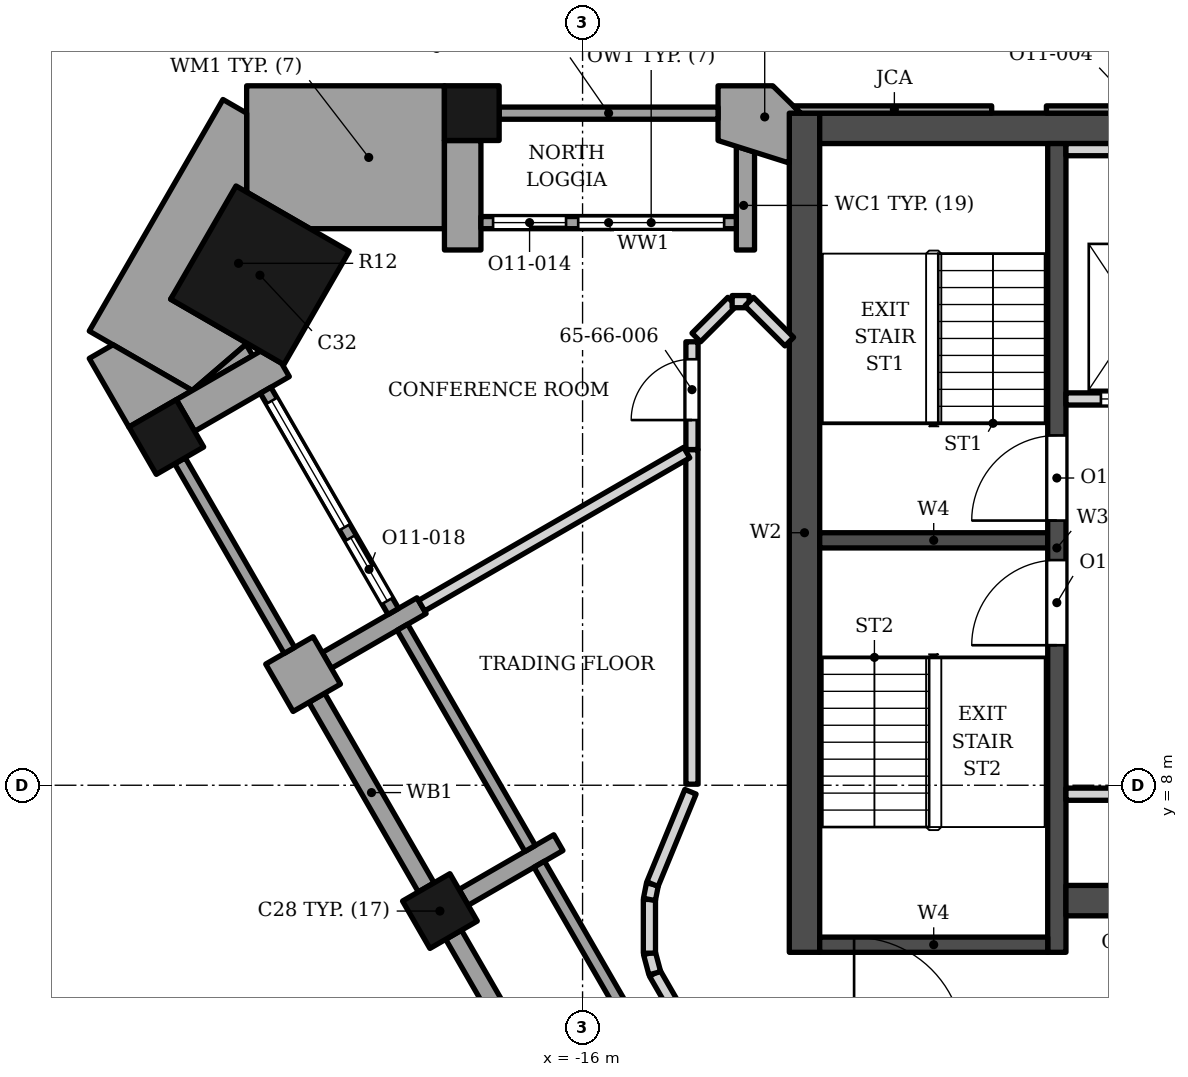
"""IFC4 building model, lengths in metres.
Left out: names, types, materials, properties, quantities, classifications, styles, units other than length and angle.
Written with IfcOpenShell. Run it as: python <this file> out.ifc"""

import sys

from ifc_helpers import new_model, si_unit, direction, frame, frame_2d, origin, origin_2d, place, context, subcontext, project, spatial, polyline, rectangle, outline, extrude, element, fill, save


model = new_model("IFC4")
c1 = context("Model", 3, precision=1e-05, world=origin(), true_north=direction((0.0, 1.0)))
c2 = subcontext(c1, "Body", "Model", "MODEL_VIEW")
j1 = project(units=[si_unit("LENGTHUNIT", "METRE"), si_unit("PLANEANGLEUNIT", "RADIAN")], contexts=[c1])
p1 = place(None, origin())
s1 = spatial("IfcSite", under=j1, at=p1, CompositionType="ELEMENT")
p2 = place(p1, origin())
s2 = spatial("IfcBuilding", under=s1, at=p2, CompositionType="ELEMENT")
p3 = place(p2, frame((0.0, 0.0, 271.6)))
s3 = spatial("IfcBuildingStorey", under=s2, at=p3, CompositionType="ELEMENT", Elevation=271.6)
p4 = place(p3, frame((-12.1, 18.802, 0.0), z_axis=(0.0, 0.0, 1.0), x_axis=(1.0, 0.0, 0.0)))
e1 = element("IfcWall", 1, at=p4, inside=s3, PredefinedType="SHEAR", context=c2, shape_type="SweptSolid", body=[
    extrude(rectangle(XDim=24.2, YDim=0.5, at=frame_2d((12.1, 0.0))), origin(), (0.0, 0.0, 1.0), 3.9),
])
p5 = place(p3, frame((-12.35, 5.253, 0.0), z_axis=(0.0, 0.0, 1.0), x_axis=(0.0, 1.0, 0.0)))
e2 = element("IfcWall", 2, at=p5, inside=s3, PredefinedType="SHEAR", context=c2, shape_type="SweptSolid", body=[
    extrude(rectangle(XDim=13.8, YDim=0.5, at=frame_2d((6.9, 0.0))), origin(), (0.0, 0.0, 1.0), 3.9),
])
p6 = place(p3, frame((-8.2, 5.253, 0.0), z_axis=(0.0, 0.0, 1.0), x_axis=(0.0, 1.0, 0.0)))
e3 = element("IfcWall", 3, at=p6, inside=s3, PredefinedType="SHEAR", context=c2, shape_type="SweptSolid", body=[
    extrude(rectangle(XDim=13.3, YDim=0.3, at=frame_2d((6.65, 0.0))), origin(), (0.0, 0.0, 1.0), 3.9),
])
p7 = place(p6, frame((7.1, 0.0, 0.0)))
e4 = element("IfcOpeningElement", 4, at=p7, cuts=e3, PredefinedType="OPENING", context=c2, shape_type="SweptSolid", body=[
    extrude(rectangle(XDim=1.4, YDim=2.1, at=frame_2d((0.7, 1.05))), frame((0.0, 0.16, 0.0), z_axis=(0.0, -1.0, 0.0), x_axis=(1.0, 0.0, 0.0)), (0.0, 0.0, 1.0), 0.32),
])
p8 = place(p6, frame((5.05, 0.0, 0.0)))
e5 = element("IfcOpeningElement", 5, at=p8, cuts=e3, PredefinedType="OPENING", context=c2, shape_type="SweptSolid", body=[
    extrude(rectangle(XDim=1.4, YDim=2.1, at=frame_2d((0.7, 1.05))), frame((0.0, 0.16, 0.0), z_axis=(0.0, -1.0, 0.0), x_axis=(1.0, 0.0, 0.0)), (0.0, 0.0, 1.0), 0.32),
])
for number, where, z_axis, x_axis in (
    (6, (-12.1, 12.028, 0.0), (0.0, 0.0, 1.0), (1.0, 0.0, 0.0)),
    (7, (-12.1, 5.378, 0.0), (0.0, 0.0, 1.0), (1.0, 0.0, 0.0)),
):
    element("IfcWall", number, at=place(p3, frame(where, z_axis=z_axis, x_axis=x_axis)), inside=s3, PredefinedType="SHEAR", context=c2, shape_type="SweptSolid", body=[
        extrude(rectangle(XDim=3.75, YDim=0.25, at=frame_2d((1.875, 0.0))), origin(), (0.0, 0.0, 1.0), 3.9),
    ])
p9 = place(p3, frame((-8.05, 6.103, 0.0), z_axis=(0.0, 0.0, 1.0), x_axis=(1.0, 0.0, 0.0)))
e8 = element("IfcWall", 8, at=p9, inside=s3, PredefinedType="SHEAR", context=c2, shape_type="SweptSolid", body=[
    extrude(rectangle(XDim=7.05, YDim=0.5, at=frame_2d((3.525, 0.0))), origin(), (0.0, 0.0, 1.0), 3.9),
])
p10 = place(p9, frame((0.825, 0.0, 0.0)))
e9 = element("IfcOpeningElement", 9, at=p10, cuts=e8, PredefinedType="OPENING", context=c2, shape_type="SweptSolid", body=[
    extrude(rectangle(XDim=0.9, YDim=2.1, at=frame_2d((0.45, 1.05))), frame((0.0, 0.26, 0.0), z_axis=(0.0, -1.0, 0.0), x_axis=(1.0, 0.0, 0.0)), (0.0, 0.0, 1.0), 0.52),
])
p11 = place(p3, frame((-21.306, 16.387, 0.0), z_axis=(0.0, 0.0, 1.0), x_axis=(0.866025412511, -0.499999984885, 0.0)))
e10 = element("IfcColumn", 10, at=p11, inside=s3, PredefinedType="COLUMN", context=c2, shape_type="SweptSolid", body=[
    extrude(rectangle(XDim=2.15, YDim=2.15, at=origin_2d()), origin(), (0.0, 0.0, 1.0), 3.9),
])
for number, where, z_axis, x_axis in (
    (11, (-22.846, 13.727, 0.0), (0.0, 0.0, 1.0), (0.5, -0.866, 0.0)),
    (12, (-18.346, 5.931, 0.0), (0.0, 0.0, 1.0), (0.5, -0.866, 0.0)),
    (13, (-17.822, 19.053, 0.0), (0.0, 0.0, 1.0), (-1.0, 0.0, 0.0)),
):
    element("IfcColumn", number, at=place(p3, frame(where, z_axis=z_axis, x_axis=x_axis)), inside=s3, PredefinedType="COLUMN", context=c2, shape_type="SweptSolid", body=[
        extrude(rectangle(XDim=0.9, YDim=0.9, at=origin_2d()), origin(), (0.0, 0.0, 1.0), 3.9),
    ])
p12 = place(p3, origin())
e14 = element("IfcWall", 14, at=p12, inside=s3, PredefinedType="SOLIDWALL", context=c2, shape_type="SweptSolid", body=[
    extrude(outline(polyline([(-21.296, 15.14), (-22.68, 14.34), (-22.38, 13.821), (-20.823, 14.72), (-20.95, 14.94), (-21.296, 15.14)])), origin(), (0.0, 0.0, 1.0), 3.0),
])
p13 = place(p3, frame((-20.986, 9.603, 0.0), z_axis=(0.0, 0.0, 1.0), x_axis=(0.866013897511, 0.50001992892, 0.0)))
e15 = element("IfcWall", 15, at=p13, inside=s3, PredefinedType="SOLIDWALL", context=c2, shape_type="SweptSolid", body=[
    extrude(rectangle(XDim=0.9, YDim=0.9, at=frame_2d((0.45, 0.0))), origin(), (0.0, 0.0, 1.0), 3.0),
])
p14 = place(p3, frame((-20.207, 10.053, 0.0), z_axis=(0.0, 0.0, 1.0), x_axis=(0.865989075817, 0.500062916607, 0.0)))
e16 = element("IfcWall", 16, at=p14, inside=s3, PredefinedType="SOLIDWALL", context=c2, shape_type="SweptSolid", body=[
    extrude(rectangle(XDim=1.8, YDim=0.3, at=frame_2d((0.9, 0.0))), origin(), (0.0, 0.0, 1.0), 3.0),
])
p15 = place(p3, frame((-17.956, 6.156, 0.0), z_axis=(0.0, 0.0, 1.0), x_axis=(0.866072636901, 0.499918180918, 0.0)))
e17 = element("IfcWall", 17, at=p15, inside=s3, PredefinedType="SOLIDWALL", context=c2, shape_type="SweptSolid", body=[
    extrude(rectangle(XDim=1.8, YDim=0.3, at=frame_2d((0.9, 0.0))), origin(), (0.0, 0.0, 1.0), 2.95),
])
p16 = place(p3, frame((-22.621, 13.335, 0.0), z_axis=(0.0, 0.0, 1.0), x_axis=(0.500012057535, -0.866018442252, 0.0)))
e18 = element("IfcWall", 18, at=p16, inside=s3, PredefinedType="SOLIDWALL", context=c2, shape_type="SweptSolid", body=[
    extrude(rectangle(XDim=3.6, YDim=0.2, at=frame_2d((1.8, 0.0))), origin(), (0.0, 0.0, 1.0), 3.0),
])
p17 = place(p3, frame((-21.212, 14.495, 0.0), z_axis=(0.0, 0.0, 1.0), x_axis=(0.500002543286, -0.866023935413, 0.0)))
e19 = element("IfcWall", 19, at=p17, inside=s3, PredefinedType="ELEMENTEDWALL", context=c2, shape_type="SweptSolid", body=[
    extrude(rectangle(XDim=4.2, YDim=0.2, at=frame_2d((2.1, 0.0))), origin(), (0.0, 0.0, 1.0), 3.0),
])
p18 = place(p17, frame((0.2, 0.0, 0.45)))
e20 = element("IfcOpeningElement", 20, at=p18, cuts=e19, PredefinedType="OPENING", context=c2, shape_type="SweptSolid", body=[
    extrude(rectangle(XDim=2.4, YDim=2.25, at=frame_2d((1.2, 1.125))), frame((0.0, 0.11, 0.0), z_axis=(0.0, -1.0, 0.0), x_axis=(1.0, 0.0, 0.0)), (0.0, 0.0, 1.0), 0.22),
])
p19 = place(p17, frame((2.8, 0.0, 0.0)))
e21 = element("IfcOpeningElement", 21, at=p19, cuts=e19, PredefinedType="OPENING", context=c2, shape_type="SweptSolid", body=[
    extrude(rectangle(XDim=1.2, YDim=2.7, at=frame_2d((0.6, 1.35))), frame((0.0, 0.11, 0.0), z_axis=(0.0, -1.0, 0.0), x_axis=(1.0, 0.0, 0.0)), (0.0, 0.0, 1.0), 0.22),
])
p20 = place(p3, frame((-20.371, 9.438, 0.0), z_axis=(0.0, 0.0, 1.0), x_axis=(0.500012057535, -0.866018442252, 0.0)))
e22 = element("IfcWall", 22, at=p20, inside=s3, PredefinedType="SOLIDWALL", context=c2, shape_type="SweptSolid", body=[
    extrude(rectangle(XDim=3.6, YDim=0.3, at=frame_2d((1.8, 0.0))), origin(), (0.0, 0.0, 1.0), 3.0),
])
p21 = place(p3, frame((-18.962, 10.598, 0.0), z_axis=(0.0, 0.0, 1.0), x_axis=(0.500027713859, -0.866009402589, 0.0)))
e23 = element("IfcWall", 23, at=p21, inside=s3, PredefinedType="ELEMENTEDWALL", context=c2, shape_type="SweptSolid", body=[
    extrude(rectangle(XDim=4.2, YDim=0.2, at=frame_2d((2.1, 0.0))), origin(), (0.0, 0.0, 1.0), 3.0),
])
p22 = place(p3, frame((-18.121, 5.541, 0.0), z_axis=(0.0, 0.0, 1.0), x_axis=(0.500012057535, -0.866018442252, 0.0)))
e24 = element("IfcWall", 24, at=p22, inside=s3, PredefinedType="SOLIDWALL", context=c2, shape_type="SweptSolid", body=[
    extrude(rectangle(XDim=3.6, YDim=0.3, at=frame_2d((1.8, 0.0))), origin(), (0.0, 0.0, 1.0), 3.0),
])
p23 = place(p3, frame((-16.712, 6.701, 0.0), z_axis=(0.0, 0.0, 1.0), x_axis=(0.500027713859, -0.866009402589, 0.0)))
e25 = element("IfcWall", 25, at=p23, inside=s3, PredefinedType="ELEMENTEDWALL", context=c2, shape_type="SweptSolid", body=[
    extrude(rectangle(XDim=4.2, YDim=0.2, at=frame_2d((2.1, 0.0))), origin(), (0.0, 0.0, 1.0), 2.95),
])
p24 = place(p3, origin())
e26 = element("IfcWall", 26, at=p24, inside=s3, PredefinedType="SOLIDWALL", context=c2, shape_type="SweptSolid", body=[
    extrude(outline(polyline([(-12.412, 19.052), (-12.872, 19.502), (-13.771, 19.502), (-13.771, 18.603), (-12.6, 18.232), (-12.6, 19.052), (-12.412, 19.052)])), origin(), (0.0, 0.0, 1.0), 3.0),
])
p25 = place(p3, origin())
e27 = element("IfcWall", 27, at=p25, inside=s3, PredefinedType="SOLIDWALL", context=c2, shape_type="SweptSolid", body=[
    extrude(outline(polyline([(-13.472, 16.802), (-13.172, 16.802), (-13.172, 18.413), (-13.472, 18.508), (-13.472, 17.153), (-13.472, 16.802)])), origin(), (0.0, 0.0, 1.0), 3.0),
])
p26 = place(p3, origin())
e28 = element("IfcWall", 28, at=p26, inside=s3, PredefinedType="SOLIDWALL", context=c2, shape_type="SweptSolid", body=[
    extrude(outline(polyline([(-18.271, 18.603), (-18.271, 16.802), (-17.672, 16.802), (-17.672, 18.603), (-18.271, 18.603)])), origin(), (0.0, 0.0, 1.0), 3.0),
])
p27 = place(p3, origin())
e29 = element("IfcWall", 29, at=p27, inside=s3, PredefinedType="ELEMENTEDWALL", context=c2, shape_type="SweptSolid", body=[
    extrude(outline(polyline([(-8.372, 19.173), (-8.372, 19.052), (-4.771, 19.052), (-4.771, 19.173), (-8.372, 19.173)])), origin(), (0.0, 0.0, 1.0), 3.0),
])
p28 = place(p3, origin())
e30 = element("IfcWall", 30, at=p28, inside=s3, PredefinedType="SOLIDWALL", context=c2, shape_type="SweptSolid", body=[
    extrude(outline(polyline([(-12.411, 19.052), (-9.271, 19.052), (-9.271, 19.173), (-12.533, 19.173), (-12.411, 19.052)])), origin(), (0.0, 0.0, 1.0), 3.0),
])
p29 = place(p3, frame((-13.771, 19.052, 0.0), z_axis=(0.0, 0.0, 1.0), x_axis=(-1.0, 0.0, 0.0)))
e31 = element("IfcWall", 31, at=p29, inside=s3, PredefinedType="SOLIDWALL", context=c2, shape_type="SweptSolid", body=[
    extrude(rectangle(XDim=3.6, YDim=0.2, at=frame_2d((1.8, 0.0))), origin(), (0.0, 0.0, 1.0), 3.0),
])
p30 = place(p3, frame((-13.472, 17.252, 0.0), z_axis=(0.0, 0.0, 1.0), x_axis=(-1.0, 0.0, 0.0)))
e32 = element("IfcWall", 32, at=p30, inside=s3, PredefinedType="ELEMENTEDWALL", context=c2, shape_type="SweptSolid", body=[
    extrude(rectangle(XDim=4.2, YDim=0.2, at=frame_2d((2.1, 0.0))), origin(), (0.0, 0.0, 1.0), 3.0),
])
p31 = place(p30, frame((0.2, 0.0, 0.45)))
e33 = element("IfcOpeningElement", 33, at=p31, cuts=e32, PredefinedType="OPENING", context=c2, shape_type="SweptSolid", body=[
    extrude(rectangle(XDim=2.4, YDim=2.25, at=frame_2d((1.2, 1.125))), frame((0.0, 0.11, 0.0), z_axis=(0.0, -1.0, 0.0), x_axis=(1.0, 0.0, 0.0)), (0.0, 0.0, 1.0), 0.22),
])
p32 = place(p30, frame((2.8, 0.0, 0.0)))
e34 = element("IfcOpeningElement", 34, at=p32, cuts=e32, PredefinedType="OPENING", context=c2, shape_type="SweptSolid", body=[
    extrude(rectangle(XDim=1.2, YDim=2.7, at=frame_2d((0.6, 1.35))), frame((0.0, 0.11, 0.0), z_axis=(0.0, -1.0, 0.0), x_axis=(1.0, 0.0, 0.0)), (0.0, 0.0, 1.0), 0.22),
])
p33 = place(p3, origin())
e35 = element("IfcWall", 35, at=p33, inside=s3, PredefinedType="SOLIDWALL", context=c2, shape_type="SweptSolid", body=[
    extrude(outline(polyline([(-20.482, 17.153), (-18.271, 17.153), (-18.271, 18.603), (-18.272, 18.603), (-18.272, 19.502), (-21.525, 19.502), (-21.525, 17.755), (-20.482, 17.153)])), origin(), (0.0, 0.0, 1.0), 3.0),
])
p34 = place(p3, origin())
e36 = element("IfcWall", 36, at=p34, inside=s3, PredefinedType="SOLIDWALL", context=c2, shape_type="SweptSolid", body=[
    extrude(outline(polyline([(-22.774, 15.993), (-21.525, 17.755), (-21.525, 19.052), (-21.914, 19.278), (-24.113, 15.469), (-22.419, 14.491), (-21.516, 15.267), (-22.774, 15.993)])), origin(), (0.0, 0.0, 1.0), 3.0),
])
p35 = place(p3, origin())
e37 = element("IfcWall", 37, at=p35, inside=s3, PredefinedType="SOLIDWALL", context=c2, shape_type="SweptSolid", body=[
    extrude(outline(polyline([(-21.534, 15.252), (-22.419, 14.491), (-23.723, 15.244), (-24.113, 15.019), (-23.461, 13.89), (-21.426, 15.065), (-21.534, 15.252)])), origin(), (0.0, 0.0, 1.0), 3.0),
])
p36 = place(p3, frame((-8.05, 7.853, 0.0), z_axis=(0.0, 0.0, 1.0), x_axis=(1.0, 0.0, 0.0)))
e38 = element("IfcWall", 38, at=p36, inside=s3, PredefinedType="SOLIDWALL", context=c2, shape_type="SweptSolid", body=[
    extrude(rectangle(XDim=2.5, YDim=0.2, at=frame_2d((1.25, 0.0))), origin(), (0.0, 0.0, 1.0), 3.73),
])
p37 = place(p3, frame((-8.05, 14.353, 0.0), z_axis=(0.0, 0.0, 1.0), x_axis=(1.0, 0.0, 0.0)))
e39 = element("IfcWall", 39, at=p37, inside=s3, PredefinedType="SOLIDWALL", context=c2, shape_type="SweptSolid", body=[
    extrude(rectangle(XDim=2.35, YDim=0.2, at=frame_2d((1.175, 0.0))), origin(), (0.0, 0.0, 1.0), 3.73),
])
p38 = place(p37, frame((0.575, 0.0, 0.0)))
e40 = element("IfcOpeningElement", 40, at=p38, cuts=e39, PredefinedType="OPENING", context=c2, shape_type="SweptSolid", body=[
    extrude(rectangle(XDim=1.2, YDim=2.1, at=frame_2d((0.6, 1.05))), frame((0.0, 0.11, 0.0), z_axis=(0.0, -1.0, 0.0), x_axis=(1.0, 0.0, 0.0)), (0.0, 0.0, 1.0), 0.22),
])
p39 = place(p3, frame((-8.05, 18.453, 0.0), z_axis=(0.0, 0.0, 1.0), x_axis=(1.0, 0.0, 0.0)))
e41 = element("IfcWall", 41, at=p39, inside=s3, PredefinedType="SOLIDWALL", context=c2, shape_type="SweptSolid", body=[
    extrude(rectangle(XDim=2.35, YDim=0.2, at=frame_2d((1.175, 0.0))), origin(), (0.0, 0.0, 1.0), 3.73),
])
p40 = place(p3, frame((-14.812, 4.908, 0.0), z_axis=(0.0, 0.0, 1.0), x_axis=(0.500021003115, -0.866013277291, 0.0)))
e42 = element("IfcWall", 42, at=p40, inside=s3, PredefinedType="PARTITIONING", context=c2, shape_type="SweptSolid", body=[
    extrude(rectangle(XDim=1.015, YDim=0.2, at=frame_2d((0.507, 0.0))), origin(), (0.0, 0.0, 1.0), 3.73),
])
p41 = place(p3, frame((-14.9, 5.238, 0.0), z_axis=(0.0, 0.0, 1.0), x_axis=(0.258640848646, -0.965973556269, 0.0)))
e43 = element("IfcWall", 43, at=p41, inside=s3, PredefinedType="PARTITIONING", context=c2, shape_type="SweptSolid", body=[
    extrude(rectangle(XDim=0.342, YDim=0.2, at=frame_2d((0.171, 0.0))), origin(), (0.0, 0.0, 1.0), 3.73),
])
p42 = place(p3, frame((-14.9, 6.122, 0.0), z_axis=(0.0, 0.0, 1.0), x_axis=(0.0, -1.0, 0.0)))
e44 = element("IfcWall", 44, at=p42, inside=s3, PredefinedType="PARTITIONING", context=c2, shape_type="SweptSolid", body=[
    extrude(rectangle(XDim=0.884, YDim=0.2, at=frame_2d((0.442, 0.0))), origin(), (0.0, 0.0, 1.0), 2.95),
])
p43 = place(p3, frame((-14.9, 6.122, 0.0), z_axis=(0.0, 0.0, 1.0), x_axis=(0.194284304518, 0.980945263008, 0.0)))
e45 = element("IfcWall", 45, at=p43, inside=s3, PredefinedType="PARTITIONING", context=c2, shape_type="SweptSolid", body=[
    extrude(rectangle(XDim=0.256, YDim=0.2, at=frame_2d((0.128, 0.0))), origin(), (0.0, 0.0, 1.0), 2.95),
])
p44 = place(p3, frame((-14.851, 6.374, 0.0), z_axis=(0.0, 0.0, 1.0), x_axis=(0.380697489052, 0.924699638709, 0.0)))
e46 = element("IfcWall", 46, at=p44, inside=s3, PredefinedType="PARTITIONING", context=c2, shape_type="SweptSolid", body=[
    extrude(rectangle(XDim=1.643, YDim=0.2, at=frame_2d((0.822, 0.0))), origin(), (0.0, 0.0, 1.0), 3.73),
])
p45 = place(p3, frame((-14.202, 13.52, 0.0), z_axis=(0.0, 0.0, 1.0), x_axis=(0.000266228859, -0.999999964561, 0.0)))
e47 = element("IfcWall", 47, at=p45, inside=s3, PredefinedType="PARTITIONING", context=c2, shape_type="SweptSolid", body=[
    extrude(rectangle(XDim=5.502, YDim=0.2, at=frame_2d((2.751, 0.0))), origin(), (0.0, 0.0, 1.0), 3.73),
])
p46 = place(p3, frame((-18.648, 10.953, 0.0), z_axis=(0.0, 0.0, 1.0), x_axis=(0.866005524168, 0.500034430925, 0.0)))
e48 = element("IfcWall", 48, at=p46, inside=s3, PredefinedType="PARTITIONING", context=c2, shape_type="SweptSolid", body=[
    extrude(rectangle(XDim=5.035, YDim=0.2, at=frame_2d((2.518, 0.0))), origin(), (0.0, 0.0, 1.0), 3.128),
])
p47 = place(p3, frame((-14.2, 13.521, 0.0), z_axis=(0.0, 0.0, 1.0), x_axis=(0.0, 1.0, 0.0)))
e49 = element("IfcWall", 49, at=p47, inside=s3, PredefinedType="PARTITIONING", context=c2, shape_type="SweptSolid", body=[
    extrude(rectangle(XDim=1.772, YDim=0.2, at=frame_2d((0.886, 0.0))), origin(), (0.0, 0.0, 1.0), 3.73),
])
p48 = place(p47, frame((0.485, 0.0, 0.0)))
e50 = element("IfcOpeningElement", 50, at=p48, cuts=e49, PredefinedType="OPENING", context=c2, shape_type="SweptSolid", body=[
    extrude(rectangle(XDim=1.0, YDim=2.1, at=frame_2d((0.5, 1.05))), frame((0.0, 0.11, 0.0), z_axis=(0.0, -1.0, 0.0), x_axis=(1.0, 0.0, 0.0)), (0.0, 0.0, 1.0), 0.22),
])
p49 = place(p3, frame((-14.13, 15.364, 0.0), z_axis=(0.0, 0.0, 1.0), x_axis=(0.707106781187, 0.707106781187, 0.0)))
e51 = element("IfcWall", 51, at=p49, inside=s3, PredefinedType="PARTITIONING", context=c2, shape_type="SweptSolid", body=[
    extrude(rectangle(XDim=0.834, YDim=0.2, at=frame_2d((0.417, 0.0))), origin(), (0.0, 0.0, 1.0), 3.73),
])
p50 = place(p3, frame((-13.54, 15.953, 0.0), z_axis=(0.0, 0.0, 1.0), x_axis=(0.99999962061, -0.000871079809, 0.0)))
e52 = element("IfcWall", 52, at=p50, inside=s3, PredefinedType="PARTITIONING", context=c2, shape_type="SweptSolid", body=[
    extrude(rectangle(XDim=0.28, YDim=0.2, at=frame_2d((0.14, 0.0))), origin(), (0.0, 0.0, 1.0), 3.73),
])
p51 = place(p3, frame((-13.26, 15.953, 0.0), z_axis=(0.0, 0.0, 1.0), x_axis=(0.708285399161, -0.705926195389, 0.0)))
e53 = element("IfcWall", 53, at=p51, inside=s3, PredefinedType="PARTITIONING", context=c2, shape_type="SweptSolid", body=[
    extrude(rectangle(XDim=0.931, YDim=0.2, at=frame_2d((0.466, 0.0))), origin(), (0.0, 0.0, 1.0), 3.73),
])
p52 = place(p18, origin())
e54 = element("IfcWindow", 54, at=p52, inside=s3, PartitioningType="SINGLE_PANEL", PredefinedType="WINDOW", context=c2, shape_type="SweptSolid", body=[
    extrude(rectangle(XDim=2.4, YDim=2.25, at=frame_2d((1.2, 1.125))), frame((0.0, 0.03, 0.0), z_axis=(0.0, -1.0, 0.0), x_axis=(1.0, 0.0, 0.0)), (0.0, 0.0, 1.0), 0.06),
])
fill(e20, e54)
p53 = place(p19, origin())
e55 = element("IfcDoor", 55, at=p53, inside=s3, OperationType="SINGLE_SWING_LEFT", PredefinedType="DOOR", context=c2, shape_type="SweptSolid", body=[
    extrude(rectangle(XDim=1.2, YDim=2.7, at=frame_2d((0.6, 1.35))), frame((0.0, 0.025, 0.0), z_axis=(0.0, -1.0, 0.0), x_axis=(1.0, 0.0, 0.0)), (0.0, 0.0, 1.0), 0.05),
])
fill(e21, e55)
p54 = place(p31, origin())
e56 = element("IfcWindow", 56, at=p54, inside=s3, PartitioningType="SINGLE_PANEL", PredefinedType="WINDOW", context=c2, shape_type="SweptSolid", body=[
    extrude(rectangle(XDim=2.4, YDim=2.25, at=frame_2d((1.2, 1.125))), frame((0.0, 0.03, 0.0), z_axis=(0.0, -1.0, 0.0), x_axis=(1.0, 0.0, 0.0)), (0.0, 0.0, 1.0), 0.06),
])
fill(e33, e56)
p55 = place(p32, origin())
e57 = element("IfcDoor", 57, at=p55, inside=s3, OperationType="SINGLE_SWING_LEFT", PredefinedType="DOOR", context=c2, shape_type="SweptSolid", body=[
    extrude(rectangle(XDim=1.2, YDim=2.7, at=frame_2d((0.6, 1.35))), frame((0.0, 0.025, 0.0), z_axis=(0.0, -1.0, 0.0), x_axis=(1.0, 0.0, 0.0)), (0.0, 0.0, 1.0), 0.05),
])
fill(e34, e57)
p56 = place(p38, origin())
e58 = element("IfcDoor", 58, at=p56, inside=s3, OperationType="DOUBLE_DOOR_SLIDING", PredefinedType="DOOR", context=c2, shape_type="SweptSolid", body=[
    extrude(rectangle(XDim=1.2, YDim=2.1, at=frame_2d((0.6, 1.05))), frame((0.0, 0.025, 0.0), z_axis=(0.0, -1.0, 0.0), x_axis=(1.0, 0.0, 0.0)), (0.0, 0.0, 1.0), 0.05),
])
fill(e40, e58)
p57 = place(p7, origin())
e59 = element("IfcDoor", 59, at=p57, inside=s3, OperationType="SINGLE_SWING_LEFT", PredefinedType="DOOR", context=c2, shape_type="SweptSolid", body=[
    extrude(rectangle(XDim=1.4, YDim=2.1, at=frame_2d((0.7, 1.05))), frame((0.0, 0.025, 0.0), z_axis=(0.0, -1.0, 0.0), x_axis=(1.0, 0.0, 0.0)), (0.0, 0.0, 1.0), 0.05),
])
fill(e4, e59)
p58 = place(p8, origin())
e60 = element("IfcDoor", 60, at=p58, inside=s3, OperationType="SINGLE_SWING_LEFT", PredefinedType="DOOR", context=c2, shape_type="SweptSolid", body=[
    extrude(rectangle(XDim=1.4, YDim=2.1, at=frame_2d((0.7, 1.05))), frame((0.0, 0.025, 0.0), z_axis=(0.0, -1.0, 0.0), x_axis=(1.0, 0.0, 0.0)), (0.0, 0.0, 1.0), 0.05),
])
fill(e5, e60)
p59 = place(p48, origin())
e61 = element("IfcDoor", 61, at=p59, inside=s3, OperationType="SINGLE_SWING_LEFT", PredefinedType="DOOR", context=c2, shape_type="SweptSolid", body=[
    extrude(rectangle(XDim=1.0, YDim=2.1, at=frame_2d((0.5, 1.05))), frame((0.0, 0.025, 0.0), z_axis=(0.0, -1.0, 0.0), x_axis=(1.0, 0.0, 0.0)), (0.0, 0.0, 1.0), 0.05),
])
fill(e50, e61)
save(model, sys.argv[1])
